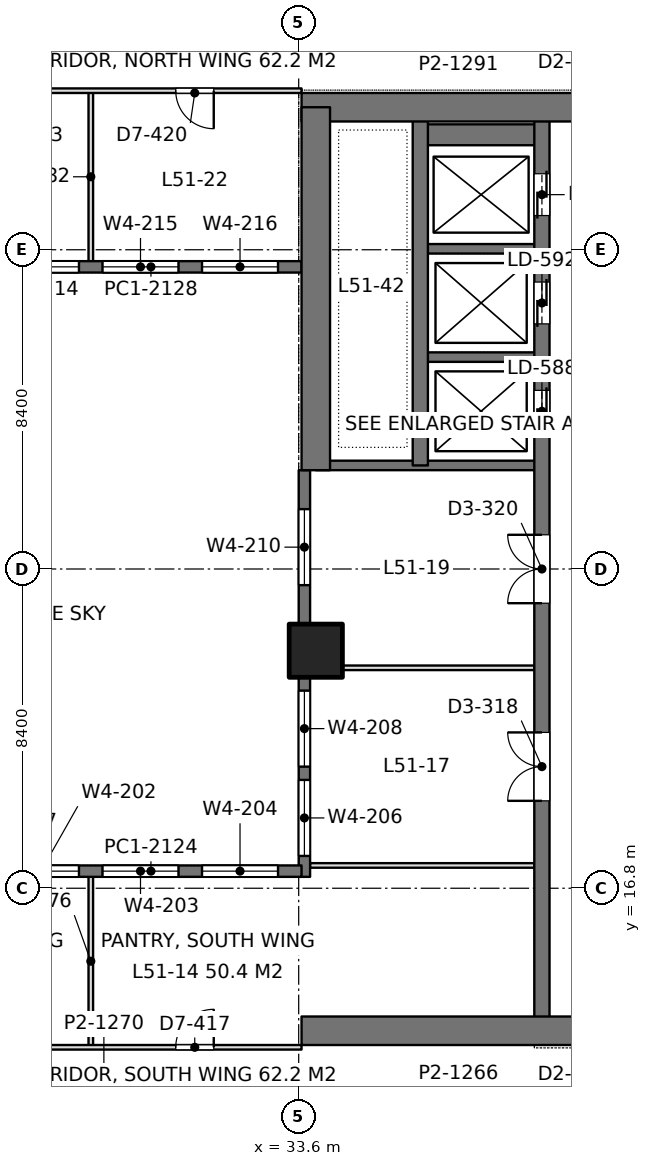
"""IFC4 building model, lengths in metres.
Left out: names, types, materials, properties, quantities, classifications, styles, units other than length and angle.
Written with IfcOpenShell. Run it as: python <this file> out.ifc"""

import sys

from ifc_helpers import new_model, si_unit, direction, frame, frame_2d, origin, origin_2d, place, context, subcontext, project, spatial, rectangle, extrude, element, fill, save


model = new_model("IFC4")
c1 = context("Model", 3, precision=1e-05, world=origin(), true_north=direction((0.0, 1.0)))
c2 = subcontext(c1, "Body", "Model", "MODEL_VIEW")
j1 = project(units=[si_unit("LENGTHUNIT", "METRE"), si_unit("PLANEANGLEUNIT", "RADIAN")], contexts=[c1])
p1 = place(None, origin())
s1 = spatial("IfcSite", under=j1, at=p1, CompositionType="ELEMENT")
p2 = place(p1, origin())
s2 = spatial("IfcBuilding", under=s1, at=p2, CompositionType="ELEMENT")
p3 = place(p2, frame((0.0, 0.0, 223.8)))
s3 = spatial("IfcBuildingStorey", under=s2, at=p3, CompositionType="ELEMENT", Elevation=223.8)
p4 = place(p3, frame((34.05, 23.05, 0.0), z_axis=(0.0, 0.0, 1.0), x_axis=(1.0, 0.0, 0.0)))
e1 = element("IfcColumn", 1, at=p4, inside=s3, PredefinedType="COLUMN", context=c2, shape_type="SweptSolid", body=[
    extrude(rectangle(XDim=1.4, YDim=1.4, at=origin_2d()), origin(), (0.0, 0.0, 1.0), 4.2),
])
p5 = place(p3, frame((33.675, 13.05, 0.0), z_axis=(0.0, 0.0, 1.0), x_axis=(1.0, 0.0, 0.0)))
e2 = element("IfcWall", 2, at=p5, inside=s3, PredefinedType="SHEAR", context=c2, shape_type="SweptSolid", body=[
    extrude(rectangle(XDim=17.85, YDim=0.75, at=frame_2d((8.925, 0.0))), origin(), (0.0, 0.0, 1.0), 4.2),
])
p6 = place(p5, frame((7.175, 0.0, 0.0)))
e3 = element("IfcOpeningElement", 3, at=p6, cuts=e2, PredefinedType="OPENING", context=c2, shape_type="SweptSolid", body=[
    extrude(rectangle(XDim=1.8, YDim=2.4, at=frame_2d((0.9, 1.2))), frame((0.0, 0.385, 0.0), z_axis=(0.0, -1.0, 0.0), x_axis=(1.0, 0.0, 0.0)), (0.0, 0.0, 1.0), 0.77),
])
p7 = place(p3, frame((33.675, 37.35, 0.0), z_axis=(0.0, 0.0, 1.0), x_axis=(1.0, 0.0, 0.0)))
e4 = element("IfcWall", 4, at=p7, inside=s3, PredefinedType="SHEAR", context=c2, shape_type="SweptSolid", body=[
    extrude(rectangle(XDim=17.85, YDim=0.75, at=frame_2d((8.925, 0.0))), origin(), (0.0, 0.0, 1.0), 4.2),
])
p8 = place(p7, frame((7.175, 0.0, 0.0)))
e5 = element("IfcOpeningElement", 5, at=p8, cuts=e4, PredefinedType="OPENING", context=c2, shape_type="SweptSolid", body=[
    extrude(rectangle(XDim=1.8, YDim=2.4, at=frame_2d((0.9, 1.2))), frame((0.0, 0.385, 0.0), z_axis=(0.0, -1.0, 0.0), x_axis=(1.0, 0.0, 0.0)), (0.0, 0.0, 1.0), 0.77),
])
p9 = place(p3, frame((34.05, 27.8, 0.0), z_axis=(0.0, 0.0, 1.0), x_axis=(0.0, 1.0, 0.0)))
e6 = element("IfcWall", 6, at=p9, inside=s3, PredefinedType="SHEAR", context=c2, shape_type="SweptSolid", body=[
    extrude(rectangle(XDim=9.55, YDim=0.75, at=frame_2d((4.775, 0.0))), origin(), (0.0, 0.0, 1.0), 4.2),
])
p10 = place(p3, frame((40.0, 13.05, 0.0), z_axis=(0.0, 0.0, 1.0), x_axis=(0.0, 1.0, 0.0)))
e7 = element("IfcWall", 7, at=p10, inside=s3, PredefinedType="SHEAR", context=c2, shape_type="SweptSolid", body=[
    extrude(rectangle(XDim=24.3, YDim=0.4, at=frame_2d((12.15, 0.0))), origin(), (0.0, 0.0, 1.0), 4.2),
])
p11 = place(p10, frame((15.75, 0.0, 0.0)))
e8 = element("IfcOpeningElement", 8, at=p11, cuts=e7, PredefinedType="OPENING", context=c2, shape_type="SweptSolid", body=[
    extrude(rectangle(XDim=1.1, YDim=2.2, at=frame_2d((0.55, 1.1))), frame((0.0, 0.21, 0.0), z_axis=(0.0, -1.0, 0.0), x_axis=(1.0, 0.0, 0.0)), (0.0, 0.0, 1.0), 0.42),
])
p12 = place(p10, frame((18.6, 0.0, 0.0)))
e9 = element("IfcOpeningElement", 9, at=p12, cuts=e7, PredefinedType="OPENING", context=c2, shape_type="SweptSolid", body=[
    extrude(rectangle(XDim=1.1, YDim=2.2, at=frame_2d((0.55, 1.1))), frame((0.0, 0.21, 0.0), z_axis=(0.0, -1.0, 0.0), x_axis=(1.0, 0.0, 0.0)), (0.0, 0.0, 1.0), 0.42),
])
p13 = place(p10, frame((21.45, 0.0, 0.0)))
e10 = element("IfcOpeningElement", 10, at=p13, cuts=e7, PredefinedType="OPENING", context=c2, shape_type="SweptSolid", body=[
    extrude(rectangle(XDim=1.1, YDim=2.2, at=frame_2d((0.55, 1.1))), frame((0.0, 0.21, 0.0), z_axis=(0.0, -1.0, 0.0), x_axis=(1.0, 0.0, 0.0)), (0.0, 0.0, 1.0), 0.42),
])
p14 = place(p10, frame((6.05, 0.0, 0.0)))
e11 = element("IfcOpeningElement", 11, at=p14, cuts=e7, PredefinedType="OPENING", context=c2, shape_type="SweptSolid", body=[
    extrude(rectangle(XDim=1.8, YDim=2.4, at=frame_2d((0.9, 1.2))), frame((0.0, 0.21, 0.0), z_axis=(0.0, -1.0, 0.0), x_axis=(1.0, 0.0, 0.0)), (0.0, 0.0, 1.0), 0.42),
])
p15 = place(p10, frame((11.25, 0.0, 0.0)))
e12 = element("IfcOpeningElement", 12, at=p15, cuts=e7, PredefinedType="OPENING", context=c2, shape_type="SweptSolid", body=[
    extrude(rectangle(XDim=1.8, YDim=2.4, at=frame_2d((0.9, 1.2))), frame((0.0, 0.21, 0.0), z_axis=(0.0, -1.0, 0.0), x_axis=(1.0, 0.0, 0.0)), (0.0, 0.0, 1.0), 0.42),
])
p16 = place(p3, frame((36.8, 27.925, 0.0), z_axis=(0.0, 0.0, 1.0), x_axis=(0.0, 1.0, 0.0)))
e13 = element("IfcWall", 13, at=p16, inside=s3, PredefinedType="SHEAR", context=c2, shape_type="SweptSolid", body=[
    extrude(rectangle(XDim=9.425, YDim=0.4, at=frame_2d((4.712, 0.0))), origin(), (0.0, 0.0, 1.0), 4.2),
])
p17 = place(p3, frame((40.0, 27.925, 0.0), z_axis=(0.0, 0.0, 1.0), x_axis=(-1.0, 0.0, 0.0)))
e14 = element("IfcWall", 14, at=p17, inside=s3, PredefinedType="SHEAR", context=c2, shape_type="SweptSolid", body=[
    extrude(rectangle(XDim=5.95, YDim=0.25, at=frame_2d((2.975, 0.0))), origin(), (0.0, 0.0, 1.0), 4.2),
])
for number, where, z_axis, x_axis in (
    (15, (40.0, 30.775, 0.0), (0.0, 0.0, 1.0), (-1.0, 0.0, 0.0)),
    (16, (40.0, 33.625, 0.0), (0.0, 0.0, 1.0), (-1.0, 0.0, 0.0)),
):
    element("IfcWall", number, at=place(p3, frame(where, z_axis=z_axis, x_axis=x_axis)), inside=s3, PredefinedType="SHEAR", context=c2, shape_type="SweptSolid", body=[
        extrude(rectangle(XDim=3.2, YDim=0.25, at=frame_2d((1.6, 0.0))), origin(), (0.0, 0.0, 1.0), 4.2),
    ])
p18 = place(p3, frame((40.0, 36.625, 0.0), z_axis=(0.0, 0.0, 1.0), x_axis=(-1.0, 0.0, 0.0)))
e17 = element("IfcWall", 17, at=p18, inside=s3, PredefinedType="SHEAR", context=c2, shape_type="SweptSolid", body=[
    extrude(rectangle(XDim=3.2, YDim=0.55, at=frame_2d((1.6, 0.0))), origin(), (0.0, 0.0, 1.0), 4.2),
])
p19 = place(p3, frame((33.75, 17.1, 0.0), z_axis=(0.0, 0.0, 1.0), x_axis=(0.0, 1.0, 0.0)))
e18 = element("IfcWall", 18, at=p19, inside=s3, PredefinedType="SOLIDWALL", context=c2, shape_type="SweptSolid", body=[
    extrude(rectangle(XDim=10.7, YDim=0.3, at=frame_2d((5.35, 0.0))), origin(), (0.0, 0.0, 1.0), 4.05),
])
p20 = place(p19, frame((0.55, 0.0, 0.9)))
e19 = element("IfcOpeningElement", 19, at=p20, cuts=e18, PredefinedType="OPENING", context=c2, shape_type="SweptSolid", body=[
    extrude(rectangle(XDim=2.0, YDim=1.9, at=frame_2d((1.0, 0.95))), frame((0.0, 0.16, 0.0), z_axis=(0.0, -1.0, 0.0), x_axis=(1.0, 0.0, 0.0)), (0.0, 0.0, 1.0), 0.32),
])
p21 = place(p19, frame((2.9, 0.0, 0.9)))
e20 = element("IfcOpeningElement", 20, at=p21, cuts=e18, PredefinedType="OPENING", context=c2, shape_type="SweptSolid", body=[
    extrude(rectangle(XDim=2.0, YDim=1.9, at=frame_2d((1.0, 0.95))), frame((0.0, 0.16, 0.0), z_axis=(0.0, -1.0, 0.0), x_axis=(1.0, 0.0, 0.0)), (0.0, 0.0, 1.0), 0.32),
])
p22 = place(p19, frame((7.675, 0.0, 0.9)))
e21 = element("IfcOpeningElement", 21, at=p22, cuts=e18, PredefinedType="OPENING", context=c2, shape_type="SweptSolid", body=[
    extrude(rectangle(XDim=2.0, YDim=1.9, at=frame_2d((1.0, 0.95))), frame((0.0, 0.16, 0.0), z_axis=(0.0, -1.0, 0.0), x_axis=(1.0, 0.0, 0.0)), (0.0, 0.0, 1.0), 0.32),
])
p23 = place(p3, frame((25.75, 17.25, 0.0), z_axis=(0.0, 0.0, 1.0), x_axis=(1.0, 0.0, 0.0)))
e22 = element("IfcWall", 22, at=p23, inside=s3, PredefinedType="SOLIDWALL", context=c2, shape_type="SweptSolid", body=[
    extrude(rectangle(XDim=7.925, YDim=0.3, at=frame_2d((3.962, 0.0))), origin(), (0.0, 0.0, 1.0), 4.05),
])
p24 = place(p23, frame((0.069, 0.0, 0.9)))
e23 = element("IfcOpeningElement", 23, at=p24, cuts=e22, PredefinedType="OPENING", context=c2, shape_type="SweptSolid", body=[
    extrude(rectangle(XDim=2.0, YDim=1.9, at=frame_2d((1.0, 0.95))), frame((0.0, 0.16, 0.0), z_axis=(0.0, -1.0, 0.0), x_axis=(1.0, 0.0, 0.0)), (0.0, 0.0, 1.0), 0.32),
])
p25 = place(p23, frame((2.688, 0.0, 0.9)))
e24 = element("IfcOpeningElement", 24, at=p25, cuts=e22, PredefinedType="OPENING", context=c2, shape_type="SweptSolid", body=[
    extrude(rectangle(XDim=2.0, YDim=1.9, at=frame_2d((1.0, 0.95))), frame((0.0, 0.16, 0.0), z_axis=(0.0, -1.0, 0.0), x_axis=(1.0, 0.0, 0.0)), (0.0, 0.0, 1.0), 0.32),
])
p26 = place(p23, frame((5.306, 0.0, 0.9)))
e25 = element("IfcOpeningElement", 25, at=p26, cuts=e22, PredefinedType="OPENING", context=c2, shape_type="SweptSolid", body=[
    extrude(rectangle(XDim=2.0, YDim=1.9, at=frame_2d((1.0, 0.95))), frame((0.0, 0.16, 0.0), z_axis=(0.0, -1.0, 0.0), x_axis=(1.0, 0.0, 0.0)), (0.0, 0.0, 1.0), 0.32),
])
p27 = place(p3, frame((25.75, 33.15, 0.0), z_axis=(0.0, 0.0, 1.0), x_axis=(1.0, 0.0, 0.0)))
e26 = element("IfcWall", 26, at=p27, inside=s3, PredefinedType="SOLIDWALL", context=c2, shape_type="SweptSolid", body=[
    extrude(rectangle(XDim=7.925, YDim=0.3, at=frame_2d((3.962, 0.0))), origin(), (0.0, 0.0, 1.0), 4.05),
])
p28 = place(p27, frame((0.069, 0.0, 0.9)))
e27 = element("IfcOpeningElement", 27, at=p28, cuts=e26, PredefinedType="OPENING", context=c2, shape_type="SweptSolid", body=[
    extrude(rectangle(XDim=2.0, YDim=1.9, at=frame_2d((1.0, 0.95))), frame((0.0, 0.16, 0.0), z_axis=(0.0, -1.0, 0.0), x_axis=(1.0, 0.0, 0.0)), (0.0, 0.0, 1.0), 0.32),
])
p29 = place(p27, frame((2.688, 0.0, 0.9)))
e28 = element("IfcOpeningElement", 28, at=p29, cuts=e26, PredefinedType="OPENING", context=c2, shape_type="SweptSolid", body=[
    extrude(rectangle(XDim=2.0, YDim=1.9, at=frame_2d((1.0, 0.95))), frame((0.0, 0.16, 0.0), z_axis=(0.0, -1.0, 0.0), x_axis=(1.0, 0.0, 0.0)), (0.0, 0.0, 1.0), 0.32),
])
p30 = place(p27, frame((5.306, 0.0, 0.9)))
e29 = element("IfcOpeningElement", 29, at=p30, cuts=e26, PredefinedType="OPENING", context=c2, shape_type="SweptSolid", body=[
    extrude(rectangle(XDim=2.0, YDim=1.9, at=frame_2d((1.0, 0.95))), frame((0.0, 0.16, 0.0), z_axis=(0.0, -1.0, 0.0), x_axis=(1.0, 0.0, 0.0)), (0.0, 0.0, 1.0), 0.32),
])
p31 = place(p3, frame((33.898, 17.4, 0.0), z_axis=(0.0, 0.0, 1.0), x_axis=(1.0, 0.0, 0.0)))
e30 = element("IfcWall", 30, at=p31, inside=s3, PredefinedType="PARTITIONING", context=c2, shape_type="SweptSolid", body=[
    extrude(rectangle(XDim=5.904, YDim=0.12, at=frame_2d((2.952, 0.0))), origin(), (0.0, 0.0, 1.0), 3.55),
])
p32 = place(p3, frame((34.749, 22.6, 0.0), z_axis=(0.0, 0.0, 1.0), x_axis=(1.0, 0.0, 0.0)))
e31 = element("IfcWall", 31, at=p32, inside=s3, PredefinedType="PARTITIONING", context=c2, shape_type="SweptSolid", body=[
    extrude(rectangle(XDim=5.053, YDim=0.12, at=frame_2d((2.526, 0.0))), origin(), (0.0, 0.0, 1.0), 4.05),
])
p33 = place(p3, frame((28.13, 12.658, 0.0), z_axis=(0.0, 0.0, 1.0), x_axis=(0.0, 1.0, 0.0)))
e32 = element("IfcWall", 32, at=p33, inside=s3, PredefinedType="PARTITIONING", context=c2, shape_type="SweptSolid", body=[
    extrude(rectangle(XDim=4.444, YDim=0.12, at=frame_2d((2.222, 0.0))), origin(), (0.0, 0.0, 1.0), 3.36),
])
p34 = place(p3, frame((16.725, 12.615, 0.0), z_axis=(0.0, 0.0, 1.0), x_axis=(1.0, 0.0, 0.0)))
e33 = element("IfcWall", 33, at=p34, inside=s3, PredefinedType="PARTITIONING", context=c2, shape_type="SweptSolid", body=[
    extrude(rectangle(XDim=16.95, YDim=0.12, at=frame_2d((8.475, 0.0))), origin(), (0.0, 0.0, 1.0), 3.55),
])
p35 = place(p34, frame((1.0, 0.0, 0.0)))
e34 = element("IfcOpeningElement", 34, at=p35, cuts=e33, PredefinedType="OPENING", context=c2, shape_type="SweptSolid", body=[
    extrude(rectangle(XDim=1.0, YDim=2.4, at=frame_2d((0.5, 1.2))), frame((0.0, 0.07, 0.0), z_axis=(0.0, -1.0, 0.0), x_axis=(1.0, 0.0, 0.0)), (0.0, 0.0, 1.0), 0.14),
])
p36 = place(p34, frame((6.665, 0.0, 0.0)))
e35 = element("IfcOpeningElement", 35, at=p36, cuts=e33, PredefinedType="OPENING", context=c2, shape_type="SweptSolid", body=[
    extrude(rectangle(XDim=1.0, YDim=2.4, at=frame_2d((0.5, 1.2))), frame((0.0, 0.07, 0.0), z_axis=(0.0, -1.0, 0.0), x_axis=(1.0, 0.0, 0.0)), (0.0, 0.0, 1.0), 0.14),
])
p37 = place(p34, frame((13.64, 0.0, 0.0)))
e36 = element("IfcOpeningElement", 36, at=p37, cuts=e33, PredefinedType="OPENING", context=c2, shape_type="SweptSolid", body=[
    extrude(rectangle(XDim=1.0, YDim=2.4, at=frame_2d((0.5, 1.2))), frame((0.0, 0.07, 0.0), z_axis=(0.0, -1.0, 0.0), x_axis=(1.0, 0.0, 0.0)), (0.0, 0.0, 1.0), 0.14),
])
p38 = place(p3, frame((28.13, 33.298, 0.0), z_axis=(0.0, 0.0, 1.0), x_axis=(0.0, 1.0, 0.0)))
e37 = element("IfcWall", 37, at=p38, inside=s3, PredefinedType="PARTITIONING", context=c2, shape_type="SweptSolid", body=[
    extrude(rectangle(XDim=4.444, YDim=0.12, at=frame_2d((2.222, 0.0))), origin(), (0.0, 0.0, 1.0), 3.36),
])
p39 = place(p3, frame((16.725, 37.785, 0.0), z_axis=(0.0, 0.0, 1.0), x_axis=(1.0, 0.0, 0.0)))
e38 = element("IfcWall", 38, at=p39, inside=s3, PredefinedType="PARTITIONING", context=c2, shape_type="SweptSolid", body=[
    extrude(rectangle(XDim=16.95, YDim=0.12, at=frame_2d((8.475, 0.0))), origin(), (0.0, 0.0, 1.0), 3.55),
])
p40 = place(p39, frame((1.0, 0.0, 0.0)))
e39 = element("IfcOpeningElement", 39, at=p40, cuts=e38, PredefinedType="OPENING", context=c2, shape_type="SweptSolid", body=[
    extrude(rectangle(XDim=1.0, YDim=2.4, at=frame_2d((0.5, 1.2))), frame((0.0, 0.07, 0.0), z_axis=(0.0, -1.0, 0.0), x_axis=(1.0, 0.0, 0.0)), (0.0, 0.0, 1.0), 0.14),
])
p41 = place(p39, frame((6.665, 0.0, 0.0)))
e40 = element("IfcOpeningElement", 40, at=p41, cuts=e38, PredefinedType="OPENING", context=c2, shape_type="SweptSolid", body=[
    extrude(rectangle(XDim=1.0, YDim=2.4, at=frame_2d((0.5, 1.2))), frame((0.0, 0.07, 0.0), z_axis=(0.0, -1.0, 0.0), x_axis=(1.0, 0.0, 0.0)), (0.0, 0.0, 1.0), 0.14),
])
p42 = place(p39, frame((13.64, 0.0, 0.0)))
e41 = element("IfcOpeningElement", 41, at=p42, cuts=e38, PredefinedType="OPENING", context=c2, shape_type="SweptSolid", body=[
    extrude(rectangle(XDim=1.0, YDim=2.4, at=frame_2d((0.5, 1.2))), frame((0.0, 0.07, 0.0), z_axis=(0.0, -1.0, 0.0), x_axis=(1.0, 0.0, 0.0)), (0.0, 0.0, 1.0), 0.14),
])
p43 = place(p20, origin())
e42 = element("IfcWindow", 42, at=p43, inside=s3, PartitioningType="SINGLE_PANEL", PredefinedType="WINDOW", context=c2, shape_type="SweptSolid", body=[
    extrude(rectangle(XDim=2.0, YDim=1.9, at=frame_2d((1.0, 0.95))), frame((0.0, 0.03, 0.0), z_axis=(0.0, -1.0, 0.0), x_axis=(1.0, 0.0, 0.0)), (0.0, 0.0, 1.0), 0.06),
])
fill(e19, e42)
p44 = place(p21, origin())
e43 = element("IfcWindow", 43, at=p44, inside=s3, PartitioningType="SINGLE_PANEL", PredefinedType="WINDOW", context=c2, shape_type="SweptSolid", body=[
    extrude(rectangle(XDim=2.0, YDim=1.9, at=frame_2d((1.0, 0.95))), frame((0.0, 0.03, 0.0), z_axis=(0.0, -1.0, 0.0), x_axis=(1.0, 0.0, 0.0)), (0.0, 0.0, 1.0), 0.06),
])
fill(e20, e43)
p45 = place(p22, origin())
e44 = element("IfcWindow", 44, at=p45, inside=s3, PartitioningType="SINGLE_PANEL", PredefinedType="WINDOW", context=c2, shape_type="SweptSolid", body=[
    extrude(rectangle(XDim=2.0, YDim=1.9, at=frame_2d((1.0, 0.95))), frame((0.0, 0.03, 0.0), z_axis=(0.0, -1.0, 0.0), x_axis=(1.0, 0.0, 0.0)), (0.0, 0.0, 1.0), 0.06),
])
fill(e21, e44)
p46 = place(p24, origin())
e45 = element("IfcWindow", 45, at=p46, inside=s3, PartitioningType="SINGLE_PANEL", PredefinedType="WINDOW", context=c2, shape_type="SweptSolid", body=[
    extrude(rectangle(XDim=2.0, YDim=1.9, at=frame_2d((1.0, 0.95))), frame((0.0, 0.03, 0.0), z_axis=(0.0, -1.0, 0.0), x_axis=(1.0, 0.0, 0.0)), (0.0, 0.0, 1.0), 0.06),
])
fill(e23, e45)
p47 = place(p25, origin())
e46 = element("IfcWindow", 46, at=p47, inside=s3, PartitioningType="SINGLE_PANEL", PredefinedType="WINDOW", context=c2, shape_type="SweptSolid", body=[
    extrude(rectangle(XDim=2.0, YDim=1.9, at=frame_2d((1.0, 0.95))), frame((0.0, 0.03, 0.0), z_axis=(0.0, -1.0, 0.0), x_axis=(1.0, 0.0, 0.0)), (0.0, 0.0, 1.0), 0.06),
])
fill(e24, e46)
p48 = place(p26, origin())
e47 = element("IfcWindow", 47, at=p48, inside=s3, PartitioningType="SINGLE_PANEL", PredefinedType="WINDOW", context=c2, shape_type="SweptSolid", body=[
    extrude(rectangle(XDim=2.0, YDim=1.9, at=frame_2d((1.0, 0.95))), frame((0.0, 0.03, 0.0), z_axis=(0.0, -1.0, 0.0), x_axis=(1.0, 0.0, 0.0)), (0.0, 0.0, 1.0), 0.06),
])
fill(e25, e47)
p49 = place(p28, origin())
e48 = element("IfcWindow", 48, at=p49, inside=s3, PartitioningType="SINGLE_PANEL", PredefinedType="WINDOW", context=c2, shape_type="SweptSolid", body=[
    extrude(rectangle(XDim=2.0, YDim=1.9, at=frame_2d((1.0, 0.95))), frame((0.0, 0.03, 0.0), z_axis=(0.0, -1.0, 0.0), x_axis=(1.0, 0.0, 0.0)), (0.0, 0.0, 1.0), 0.06),
])
fill(e27, e48)
p50 = place(p29, origin())
e49 = element("IfcWindow", 49, at=p50, inside=s3, PartitioningType="SINGLE_PANEL", PredefinedType="WINDOW", context=c2, shape_type="SweptSolid", body=[
    extrude(rectangle(XDim=2.0, YDim=1.9, at=frame_2d((1.0, 0.95))), frame((0.0, 0.03, 0.0), z_axis=(0.0, -1.0, 0.0), x_axis=(1.0, 0.0, 0.0)), (0.0, 0.0, 1.0), 0.06),
])
fill(e28, e49)
p51 = place(p30, origin())
e50 = element("IfcWindow", 50, at=p51, inside=s3, PartitioningType="SINGLE_PANEL", PredefinedType="WINDOW", context=c2, shape_type="SweptSolid", body=[
    extrude(rectangle(XDim=2.0, YDim=1.9, at=frame_2d((1.0, 0.95))), frame((0.0, 0.03, 0.0), z_axis=(0.0, -1.0, 0.0), x_axis=(1.0, 0.0, 0.0)), (0.0, 0.0, 1.0), 0.06),
])
fill(e29, e50)
p52 = place(p11, origin())
e51 = element("IfcDoor", 51, at=p52, inside=s3, OperationType="DOUBLE_DOOR_SLIDING", PredefinedType="DOOR", context=c2, shape_type="SweptSolid", body=[
    extrude(rectangle(XDim=1.1, YDim=2.2, at=frame_2d((0.55, 1.1))), frame((0.0, 0.025, 0.0), z_axis=(0.0, -1.0, 0.0), x_axis=(1.0, 0.0, 0.0)), (0.0, 0.0, 1.0), 0.05),
])
fill(e8, e51)
p53 = place(p12, origin())
e52 = element("IfcDoor", 52, at=p53, inside=s3, OperationType="DOUBLE_DOOR_SLIDING", PredefinedType="DOOR", context=c2, shape_type="SweptSolid", body=[
    extrude(rectangle(XDim=1.1, YDim=2.2, at=frame_2d((0.55, 1.1))), frame((0.0, 0.025, 0.0), z_axis=(0.0, -1.0, 0.0), x_axis=(1.0, 0.0, 0.0)), (0.0, 0.0, 1.0), 0.05),
])
fill(e9, e52)
p54 = place(p13, origin())
e53 = element("IfcDoor", 53, at=p54, inside=s3, OperationType="DOUBLE_DOOR_SLIDING", PredefinedType="DOOR", context=c2, shape_type="SweptSolid", body=[
    extrude(rectangle(XDim=1.1, YDim=2.2, at=frame_2d((0.55, 1.1))), frame((0.0, 0.025, 0.0), z_axis=(0.0, -1.0, 0.0), x_axis=(1.0, 0.0, 0.0)), (0.0, 0.0, 1.0), 0.05),
])
fill(e10, e53)
p55 = place(p14, origin())
e54 = element("IfcDoor", 54, at=p55, inside=s3, OperationType="DOUBLE_DOOR_SINGLE_SWING", PredefinedType="DOOR", context=c2, shape_type="SweptSolid", body=[
    extrude(rectangle(XDim=1.8, YDim=2.4, at=frame_2d((0.9, 1.2))), frame((0.0, 0.025, 0.0), z_axis=(0.0, -1.0, 0.0), x_axis=(1.0, 0.0, 0.0)), (0.0, 0.0, 1.0), 0.05),
])
fill(e11, e54)
p56 = place(p15, origin())
e55 = element("IfcDoor", 55, at=p56, inside=s3, OperationType="DOUBLE_DOOR_SINGLE_SWING", PredefinedType="DOOR", context=c2, shape_type="SweptSolid", body=[
    extrude(rectangle(XDim=1.8, YDim=2.4, at=frame_2d((0.9, 1.2))), frame((0.0, 0.025, 0.0), z_axis=(0.0, -1.0, 0.0), x_axis=(1.0, 0.0, 0.0)), (0.0, 0.0, 1.0), 0.05),
])
fill(e12, e55)
p57 = place(p37, origin())
e56 = element("IfcDoor", 56, at=p57, inside=s3, OperationType="SINGLE_SWING_RIGHT", PredefinedType="DOOR", context=c2, shape_type="SweptSolid", body=[
    extrude(rectangle(XDim=1.0, YDim=2.4, at=frame_2d((0.5, 1.2))), frame((0.0, 0.025, 0.0), z_axis=(0.0, -1.0, 0.0), x_axis=(1.0, 0.0, 0.0)), (0.0, 0.0, 1.0), 0.05),
])
fill(e36, e56)
p58 = place(p42, frame((1.0, 0.0, 0.0), z_axis=(0.0, 0.0, 1.0), x_axis=(-1.0, 0.0, 0.0)))
e57 = element("IfcDoor", 57, at=p58, inside=s3, OperationType="SINGLE_SWING_LEFT", PredefinedType="DOOR", context=c2, shape_type="SweptSolid", body=[
    extrude(rectangle(XDim=1.0, YDim=2.4, at=frame_2d((0.5, 1.2))), frame((0.0, 0.025, 0.0), z_axis=(0.0, -1.0, 0.0), x_axis=(1.0, 0.0, 0.0)), (0.0, 0.0, 1.0), 0.05),
])
fill(e41, e57)
save(model, sys.argv[1])
